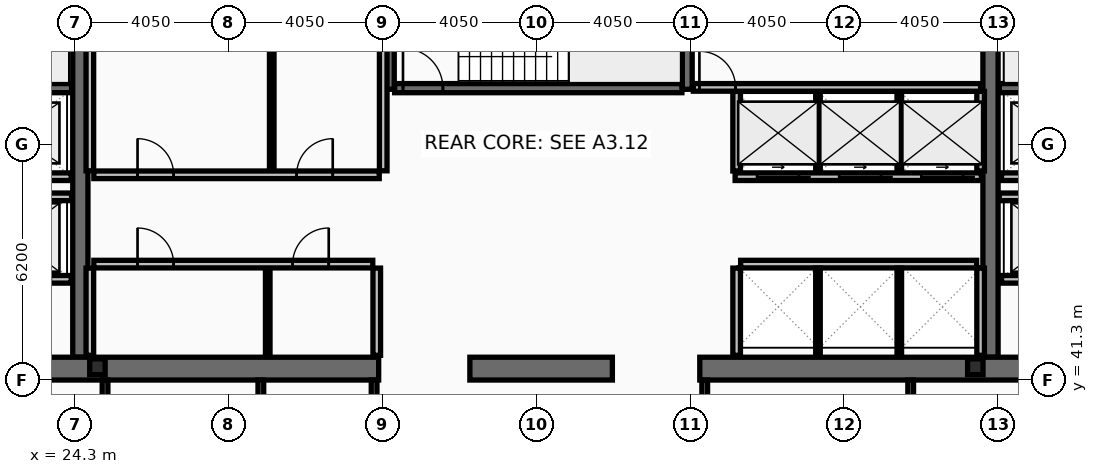
"""IFC4 building model, lengths in metres.
Left out: names, types, materials, properties, quantities, classifications, styles, units other than length and angle.
Written with IfcOpenShell. Run it as: python <this file> out.ifc"""

import sys

from ifc_helpers import new_model, si_unit, direction, frame, frame_2d, origin, origin_2d, place, context, subcontext, project, spatial, rectangle, i_section, extrude, element, fill, save


model = new_model("IFC4")
c1 = context("Model", 3, precision=1e-05, world=origin(), true_north=direction((0.0, 1.0)))
c2 = subcontext(c1, "Body", "Model", "MODEL_VIEW")
j1 = project(units=[si_unit("LENGTHUNIT", "METRE"), si_unit("PLANEANGLEUNIT", "RADIAN")], contexts=[c1])
p1 = place(None, origin())
s1 = spatial("IfcSite", under=j1, at=p1, CompositionType="ELEMENT")
p2 = place(p1, origin())
s2 = spatial("IfcBuilding", under=s1, at=p2, CompositionType="ELEMENT")
p3 = place(p2, frame((0.0, 0.0, 206.6)))
s3 = spatial("IfcBuildingStorey", under=s2, at=p3, CompositionType="ELEMENT", Elevation=206.6)
for number, where, z_axis, x_axis in (
    (1, (24.45, 41.9, 0.0), (0.0, 0.0, 1.0), (0.0, 1.0, 0.0)),
    (2, (48.4, 41.9, 0.0), (0.0, 0.0, 1.0), (0.0, 1.0, 0.0)),
):
    element("IfcWall", number, at=place(p3, frame(where, z_axis=z_axis, x_axis=x_axis)), inside=s3, PredefinedType="SHEAR", context=c2, shape_type="SweptSolid", body=[
        extrude(rectangle(XDim=11.2, YDim=0.4, at=frame_2d((5.6, 0.0))), origin(), (0.0, 0.0, 1.0), 3.44),
    ])
p4 = place(p3, frame((32.3, 41.6, 0.0), z_axis=(0.0, 0.0, 1.0), x_axis=(-1.0, 0.0, 0.0)))
e3 = element("IfcWall", 3, at=p4, inside=s3, PredefinedType="SHEAR", context=c2, shape_type="SweptSolid", body=[
    extrude(rectangle(XDim=11.45, YDim=0.6, at=frame_2d((5.725, 0.0))), origin(), (0.0, 0.0, 1.0), 3.44),
])
p5 = place(p3, frame((38.45, 41.6, 0.0), z_axis=(0.0, 0.0, 1.0), x_axis=(-1.0, 0.0, 0.0)))
e4 = element("IfcWall", 4, at=p5, inside=s3, PredefinedType="SHEAR", context=c2, shape_type="SweptSolid", body=[
    extrude(rectangle(XDim=3.75, YDim=0.6, at=frame_2d((1.875, 0.0))), origin(), (0.0, 0.0, 1.0), 3.44),
])
p6 = place(p3, frame((52.05, 41.6, 0.0), z_axis=(0.0, 0.0, 1.0), x_axis=(-1.0, 0.0, 0.0)))
e5 = element("IfcWall", 5, at=p6, inside=s3, PredefinedType="SHEAR", context=c2, shape_type="SweptSolid", body=[
    extrude(rectangle(XDim=11.3, YDim=0.6, at=frame_2d((5.65, 0.0))), origin(), (0.0, 0.0, 1.0), 3.44),
])
for number, where, z_axis, x_axis in (
    (6, (32.58, 48.95, 0.0), (0.0, 0.0, 1.0), (0.0, 1.0, 0.0)),
    (7, (40.42, 48.95, 0.0), (0.0, 0.0, 1.0), (0.0, 1.0, 0.0)),
):
    element("IfcWall", number, at=place(p3, frame(where, z_axis=z_axis, x_axis=x_axis)), inside=s3, PredefinedType="SHEAR", context=c2, shape_type="SweptSolid", body=[
        extrude(rectangle(XDim=4.15, YDim=0.26, at=frame_2d((2.075, 0.0))), origin(), (0.0, 0.0, 1.0), 3.44),
    ])
p7 = place(p3, frame((16.8, 48.98, 0.0), z_axis=(0.0, 0.0, 1.0), x_axis=(1.0, 0.0, 0.0)))
e8 = element("IfcWall", 8, at=p7, inside=s3, PredefinedType="SHEAR", context=c2, shape_type="SweptSolid", body=[
    extrude(rectangle(XDim=7.42, YDim=0.24, at=frame_2d((3.71, 0.0))), origin(), (0.0, 0.0, 1.0), 3.44),
])
p8 = place(p7, frame((0.22, 0.0, 0.0)))
e9 = element("IfcOpeningElement", 9, at=p8, cuts=e8, PredefinedType="OPENING", context=c2, shape_type="SweptSolid", body=[
    extrude(rectangle(XDim=1.05, YDim=2.15, at=frame_2d((0.525, 1.075))), frame((0.0, 0.13, 0.0), z_axis=(0.0, -1.0, 0.0), x_axis=(1.0, 0.0, 0.0)), (0.0, 0.0, 1.0), 0.26),
])
p9 = place(p3, frame((48.63, 48.98, 0.0), z_axis=(0.0, 0.0, 1.0), x_axis=(1.0, 0.0, 0.0)))
e10 = element("IfcWall", 10, at=p9, inside=s3, PredefinedType="SHEAR", context=c2, shape_type="SweptSolid", body=[
    extrude(rectangle(XDim=7.47, YDim=0.24, at=frame_2d((3.735, 0.0))), origin(), (0.0, 0.0, 1.0), 3.44),
])
p10 = place(p9, frame((6.2, 0.0, 0.0)))
e11 = element("IfcOpeningElement", 11, at=p10, cuts=e10, PredefinedType="OPENING", context=c2, shape_type="SweptSolid", body=[
    extrude(rectangle(XDim=1.05, YDim=2.15, at=frame_2d((0.525, 1.075))), frame((0.0, 0.13, 0.0), z_axis=(0.0, -1.0, 0.0), x_axis=(1.0, 0.0, 0.0)), (0.0, 0.0, 1.0), 0.26),
])
p11 = place(p3, frame((32.72, 48.98, 0.0), z_axis=(0.0, 0.0, 1.0), x_axis=(1.0, 0.0, 0.0)))
e12 = element("IfcWall", 12, at=p11, inside=s3, PredefinedType="SHEAR", context=c2, shape_type="SweptSolid", body=[
    extrude(rectangle(XDim=7.56, YDim=0.24, at=frame_2d((3.78, 0.0))), origin(), (0.0, 0.0, 1.0), 3.44),
])
p12 = place(p11, frame((0.22, 0.0, 0.0)))
e13 = element("IfcOpeningElement", 13, at=p12, cuts=e12, PredefinedType="OPENING", context=c2, shape_type="SweptSolid", body=[
    extrude(rectangle(XDim=1.05, YDim=2.15, at=frame_2d((0.525, 1.075))), frame((0.0, 0.13, 0.0), z_axis=(0.0, -1.0, 0.0), x_axis=(1.0, 0.0, 0.0)), (0.0, 0.0, 1.0), 0.26),
])
for number, where, z_axis, x_axis in (
    (14, (24.9, 41.65, 0.0), (0.0, 0.0, 1.0), (1.0, 0.0, 0.0)),
    (15, (48.0, 41.65, 0.0), (0.0, 0.0, 1.0), (1.0, 0.0, 0.0)),
):
    element("IfcColumn", number, at=place(p3, frame(where, z_axis=z_axis, x_axis=x_axis)), inside=s3, PredefinedType="COLUMN", context=c2, shape_type="SweptSolid", body=[
        extrude(i_section(OverallWidth=0.406, OverallDepth=0.416, WebThickness=0.03, FlangeThickness=0.048, at=origin_2d()), origin(), (0.0, 0.0, 1.0), 3.6),
    ])
p13 = place(p3, frame((51.61, 43.95, 0.0), z_axis=(0.0, 0.0, 1.0), x_axis=(-1.0, 0.0, 0.0)))
e16 = element("IfcWall", 16, at=p13, inside=s3, PredefinedType="PARTITIONING", context=c2, shape_type="SweptSolid", body=[
    extrude(rectangle(XDim=2.92, YDim=0.2, at=frame_2d((1.46, 0.0))), origin(), (0.0, 0.0, 1.0), 3.44),
])
p14 = place(p13, frame((0.81, 0.0, 0.0)))
e17 = element("IfcOpeningElement", 17, at=p14, cuts=e16, PredefinedType="OPENING", context=c2, shape_type="SweptSolid", body=[
    extrude(rectangle(XDim=1.3, YDim=2.18, at=frame_2d((0.65, 1.09))), frame((0.0, 0.11, 0.0), z_axis=(0.0, -1.0, 0.0), x_axis=(1.0, 0.0, 0.0)), (0.0, 0.0, 1.0), 0.22),
])
p15 = place(p3, frame((24.21, 43.95, 0.0), z_axis=(0.0, 0.0, 1.0), x_axis=(-1.0, 0.0, 0.0)))
e18 = element("IfcWall", 18, at=p15, inside=s3, PredefinedType="PARTITIONING", context=c2, shape_type="SweptSolid", body=[
    extrude(rectangle(XDim=2.97, YDim=0.2, at=frame_2d((1.485, 0.0))), origin(), (0.0, 0.0, 1.0), 3.44),
])
p16 = place(p15, frame((0.86, 0.0, 0.0)))
e19 = element("IfcOpeningElement", 19, at=p16, cuts=e18, PredefinedType="OPENING", context=c2, shape_type="SweptSolid", body=[
    extrude(rectangle(XDim=1.3, YDim=2.18, at=frame_2d((0.65, 1.09))), frame((0.0, 0.11, 0.0), z_axis=(0.0, -1.0, 0.0), x_axis=(1.0, 0.0, 0.0)), (0.0, 0.0, 1.0), 0.22),
])
p17 = place(p3, frame((51.61, 46.65, 0.0), z_axis=(0.0, 0.0, 1.0), x_axis=(-1.0, 0.0, 0.0)))
e20 = element("IfcWall", 20, at=p17, inside=s3, PredefinedType="PARTITIONING", context=c2, shape_type="SweptSolid", body=[
    extrude(rectangle(XDim=2.92, YDim=0.2, at=frame_2d((1.46, 0.0))), origin(), (0.0, 0.0, 1.0), 3.44),
])
p18 = place(p17, frame((0.86, 0.0, 0.0)))
e21 = element("IfcOpeningElement", 21, at=p18, cuts=e20, PredefinedType="OPENING", context=c2, shape_type="SweptSolid", body=[
    extrude(rectangle(XDim=1.2, YDim=2.18, at=frame_2d((0.6, 1.09))), frame((0.0, 0.11, 0.0), z_axis=(0.0, -1.0, 0.0), x_axis=(1.0, 0.0, 0.0)), (0.0, 0.0, 1.0), 0.22),
])
p19 = place(p3, frame((24.21, 46.65, 0.0), z_axis=(0.0, 0.0, 1.0), x_axis=(-1.0, 0.0, 0.0)))
e22 = element("IfcWall", 22, at=p19, inside=s3, PredefinedType="PARTITIONING", context=c2, shape_type="SweptSolid", body=[
    extrude(rectangle(XDim=2.97, YDim=0.2, at=frame_2d((1.485, 0.0))), origin(), (0.0, 0.0, 1.0), 3.44),
])
p20 = place(p19, frame((0.91, 0.0, 0.0)))
e23 = element("IfcOpeningElement", 23, at=p20, cuts=e22, PredefinedType="OPENING", context=c2, shape_type="SweptSolid", body=[
    extrude(rectangle(XDim=1.2, YDim=2.18, at=frame_2d((0.6, 1.09))), frame((0.0, 0.11, 0.0), z_axis=(0.0, -1.0, 0.0), x_axis=(1.0, 0.0, 0.0)), (0.0, 0.0, 1.0), 0.22),
])
p21 = place(p3, frame((48.16, 46.65, 0.0), z_axis=(0.0, 0.0, 1.0), x_axis=(-1.0, 0.0, 0.0)))
e24 = element("IfcWall", 24, at=p21, inside=s3, PredefinedType="PARTITIONING", context=c2, shape_type="SweptSolid", body=[
    extrude(rectangle(XDim=6.48, YDim=0.2, at=frame_2d((3.24, 0.0))), origin(), (0.0, 0.0, 1.0), 3.44),
])
p22 = place(p21, frame((4.8, 0.0, 0.0)))
e25 = element("IfcOpeningElement", 25, at=p22, cuts=e24, PredefinedType="OPENING", context=c2, shape_type="SweptSolid", body=[
    extrude(rectangle(XDim=1.1, YDim=2.18, at=frame_2d((0.55, 1.09))), frame((0.0, 0.11, 0.0), z_axis=(0.0, -1.0, 0.0), x_axis=(1.0, 0.0, 0.0)), (0.0, 0.0, 1.0), 0.22),
])
p23 = place(p21, frame((2.64, 0.0, 0.0)))
e26 = element("IfcOpeningElement", 26, at=p23, cuts=e24, PredefinedType="OPENING", context=c2, shape_type="SweptSolid", body=[
    extrude(rectangle(XDim=1.1, YDim=2.18, at=frame_2d((0.55, 1.09))), frame((0.0, 0.11, 0.0), z_axis=(0.0, -1.0, 0.0), x_axis=(1.0, 0.0, 0.0)), (0.0, 0.0, 1.0), 0.22),
])
p24 = place(p21, frame((0.48, 0.0, 0.0)))
e27 = element("IfcOpeningElement", 27, at=p24, cuts=e24, PredefinedType="OPENING", context=c2, shape_type="SweptSolid", body=[
    extrude(rectangle(XDim=1.1, YDim=2.18, at=frame_2d((0.55, 1.09))), frame((0.0, 0.11, 0.0), z_axis=(0.0, -1.0, 0.0), x_axis=(1.0, 0.0, 0.0)), (0.0, 0.0, 1.0), 0.22),
])
p25 = place(p3, frame((21.2, 46.12, 0.0), z_axis=(0.0, 0.0, 1.0), x_axis=(1.0, 0.0, 0.0)))
e28 = element("IfcWall", 28, at=p25, inside=s3, PredefinedType="PARTITIONING", context=c2, shape_type="SweptSolid", body=[
    extrude(rectangle(XDim=3.02, YDim=0.2, at=frame_2d((1.51, 0.0))), origin(), (0.0, 0.0, 1.0), 3.44),
])
p26 = place(p3, frame((48.63, 46.12, 0.0), z_axis=(0.0, 0.0, 1.0), x_axis=(1.0, 0.0, 0.0)))
e29 = element("IfcWall", 29, at=p26, inside=s3, PredefinedType="PARTITIONING", context=c2, shape_type="SweptSolid", body=[
    extrude(rectangle(XDim=3.07, YDim=0.2, at=frame_2d((1.535, 0.0))), origin(), (0.0, 0.0, 1.0), 3.44),
])
for number, where, z_axis, x_axis in (
    (30, (24.7, 46.805, 0.0), (0.0, 0.0, 1.0), (0.0, 1.0, 0.0)),
    (31, (32.42, 46.805, 0.0), (0.0, 0.0, 1.0), (0.0, 1.0, 0.0)),
):
    element("IfcWall", number, at=place(p3, frame(where, z_axis=z_axis, x_axis=x_axis)), inside=s3, PredefinedType="PARTITIONING", context=c2, shape_type="SweptSolid", body=[
        extrude(rectangle(XDim=5.99, YDim=0.2, at=frame_2d((2.995, 0.0))), origin(), (0.0, 0.0, 1.0), 3.44),
    ])
p27 = place(p3, frame((29.486, 46.805, 0.0), z_axis=(0.0, 0.0, 1.0), x_axis=(0.0, 1.0, 0.0)))
e32 = element("IfcWall", 32, at=p27, inside=s3, PredefinedType="PARTITIONING", context=c2, shape_type="SweptSolid", body=[
    extrude(rectangle(XDim=5.99, YDim=0.12, at=frame_2d((2.995, 0.0))), origin(), (0.0, 0.0, 1.0), 3.44),
])
p28 = place(p3, frame((24.805, 46.7, 0.0), z_axis=(0.0, 0.0, 1.0), x_axis=(1.0, 0.0, 0.0)))
e33 = element("IfcWall", 33, at=p28, inside=s3, PredefinedType="PARTITIONING", context=c2, shape_type="SweptSolid", body=[
    extrude(rectangle(XDim=7.51, YDim=0.2, at=frame_2d((3.755, 0.0))), origin(), (0.0, 0.0, 1.0), 3.44),
])
p29 = place(p28, frame((1.15, 0.0, 0.0)))
e34 = element("IfcOpeningElement", 34, at=p29, cuts=e33, PredefinedType="OPENING", context=c2, shape_type="SweptSolid", body=[
    extrude(rectangle(XDim=0.95, YDim=2.1, at=frame_2d((0.475, 1.05))), frame((0.0, 0.11, 0.0), z_axis=(0.0, -1.0, 0.0), x_axis=(1.0, 0.0, 0.0)), (0.0, 0.0, 1.0), 0.22),
])
p30 = place(p28, frame((5.336, 0.0, 0.0)))
e35 = element("IfcOpeningElement", 35, at=p30, cuts=e33, PredefinedType="OPENING", context=c2, shape_type="SweptSolid", body=[
    extrude(rectangle(XDim=0.95, YDim=2.1, at=frame_2d((0.475, 1.05))), frame((0.0, 0.11, 0.0), z_axis=(0.0, -1.0, 0.0), x_axis=(1.0, 0.0, 0.0)), (0.0, 0.0, 1.0), 0.22),
])
for number, where, z_axis, x_axis in (
    (36, (24.7, 41.95, 0.0), (0.0, 0.0, 1.0), (0.0, 1.0, 0.0)),
    (37, (32.25, 41.95, 0.0), (0.0, 0.0, 1.0), (0.0, 1.0, 0.0)),
):
    element("IfcWall", number, at=place(p3, frame(where, z_axis=z_axis, x_axis=x_axis)), inside=s3, PredefinedType="PARTITIONING", context=c2, shape_type="SweptSolid", body=[
        extrude(rectangle(XDim=2.295, YDim=0.2, at=frame_2d((1.147, 0.0))), origin(), (0.0, 0.0, 1.0), 3.44),
    ])
p31 = place(p3, frame((29.381, 41.95, 0.0), z_axis=(0.0, 0.0, 1.0), x_axis=(0.0, 1.0, 0.0)))
e38 = element("IfcWall", 38, at=p31, inside=s3, PredefinedType="PARTITIONING", context=c2, shape_type="SweptSolid", body=[
    extrude(rectangle(XDim=2.295, YDim=0.12, at=frame_2d((1.147, 0.0))), origin(), (0.0, 0.0, 1.0), 3.44),
])
p32 = place(p3, frame((24.805, 44.35, 0.0), z_axis=(0.0, 0.0, 1.0), x_axis=(1.0, 0.0, 0.0)))
e39 = element("IfcWall", 39, at=p32, inside=s3, PredefinedType="PARTITIONING", context=c2, shape_type="SweptSolid", body=[
    extrude(rectangle(XDim=7.34, YDim=0.2, at=frame_2d((3.67, 0.0))), origin(), (0.0, 0.0, 1.0), 3.44),
])
p33 = place(p32, frame((1.15, 0.0, 0.0)))
e40 = element("IfcOpeningElement", 40, at=p33, cuts=e39, PredefinedType="OPENING", context=c2, shape_type="SweptSolid", body=[
    extrude(rectangle(XDim=0.95, YDim=2.1, at=frame_2d((0.475, 1.05))), frame((0.0, 0.11, 0.0), z_axis=(0.0, -1.0, 0.0), x_axis=(1.0, 0.0, 0.0)), (0.0, 0.0, 1.0), 0.22),
])
p34 = place(p32, frame((5.231, 0.0, 0.0)))
e41 = element("IfcOpeningElement", 41, at=p34, cuts=e39, PredefinedType="OPENING", context=c2, shape_type="SweptSolid", body=[
    extrude(rectangle(XDim=0.95, YDim=2.1, at=frame_2d((0.475, 1.05))), frame((0.0, 0.11, 0.0), z_axis=(0.0, -1.0, 0.0), x_axis=(1.0, 0.0, 0.0)), (0.0, 0.0, 1.0), 0.22),
])
for number, where, z_axis, x_axis in (
    (42, (41.72, 46.8, 0.0), (0.0, 0.0, 1.0), (0.0, 1.0, 0.0)),
    (43, (48.14, 46.8, 0.0), (0.0, 0.0, 1.0), (0.0, 1.0, 0.0)),
):
    element("IfcWall", number, at=place(p3, frame(where, z_axis=z_axis, x_axis=x_axis)), inside=s3, PredefinedType="PARTITIONING", context=c2, shape_type="SweptSolid", body=[
        extrude(rectangle(XDim=2.095, YDim=0.2, at=frame_2d((1.047, 0.0))), origin(), (0.0, 0.0, 1.0), 3.44),
    ])
for number, where, z_axis, x_axis in (
    (44, (43.86, 46.8, 0.0), (0.0, 0.0, 1.0), (0.0, 1.0, 0.0)),
    (45, (46.0, 46.8, 0.0), (0.0, 0.0, 1.0), (0.0, 1.0, 0.0)),
):
    element("IfcWall", number, at=place(p3, frame(where, z_axis=z_axis, x_axis=x_axis)), inside=s3, PredefinedType="PARTITIONING", context=c2, shape_type="SweptSolid", body=[
        extrude(rectangle(XDim=2.095, YDim=0.12, at=frame_2d((1.047, 0.0))), origin(), (0.0, 0.0, 1.0), 3.44),
    ])
p35 = place(p3, frame((41.825, 44.35, 0.0), z_axis=(0.0, 0.0, 1.0), x_axis=(1.0, 0.0, 0.0)))
e46 = element("IfcWall", 46, at=p35, inside=s3, PredefinedType="PARTITIONING", context=c2, shape_type="SweptSolid", body=[
    extrude(rectangle(XDim=6.21, YDim=0.2, at=frame_2d((3.105, 0.0))), origin(), (0.0, 0.0, 1.0), 3.44),
])
for number, where, z_axis, x_axis in (
    (47, (41.72, 41.95, 0.0), (0.0, 0.0, 1.0), (0.0, 1.0, 0.0)),
    (48, (48.14, 41.95, 0.0), (0.0, 0.0, 1.0), (0.0, 1.0, 0.0)),
):
    element("IfcWall", number, at=place(p3, frame(where, z_axis=z_axis, x_axis=x_axis)), inside=s3, PredefinedType="PARTITIONING", context=c2, shape_type="SweptSolid", body=[
        extrude(rectangle(XDim=2.295, YDim=0.2, at=frame_2d((1.147, 0.0))), origin(), (0.0, 0.0, 1.0), 3.44),
    ])
for number, where, z_axis, x_axis in (
    (49, (43.86, 41.95, 0.0), (0.0, 0.0, 1.0), (0.0, 1.0, 0.0)),
    (50, (46.0, 41.95, 0.0), (0.0, 0.0, 1.0), (0.0, 1.0, 0.0)),
):
    element("IfcWall", number, at=place(p3, frame(where, z_axis=z_axis, x_axis=x_axis)), inside=s3, PredefinedType="PARTITIONING", context=c2, shape_type="SweptSolid", body=[
        extrude(rectangle(XDim=2.295, YDim=0.12, at=frame_2d((1.147, 0.0))), origin(), (0.0, 0.0, 1.0), 3.44),
    ])
p36 = place(p3, frame((40.58, 49.0, 0.0), z_axis=(0.0, 0.0, 1.0), x_axis=(1.0, 0.0, 0.0)))
e51 = element("IfcWall", 51, at=p36, inside=s3, PredefinedType="PARTITIONING", context=c2, shape_type="SweptSolid", body=[
    extrude(rectangle(XDim=7.56, YDim=0.2, at=frame_2d((3.78, 0.0))), origin(), (0.0, 0.0, 1.0), 3.44),
])
p37 = place(p36, frame((0.16, 0.0, 0.0)))
e52 = element("IfcOpeningElement", 52, at=p37, cuts=e51, PredefinedType="OPENING", context=c2, shape_type="SweptSolid", body=[
    extrude(rectangle(XDim=0.95, YDim=2.1, at=frame_2d((0.475, 1.05))), frame((0.0, 0.11, 0.0), z_axis=(0.0, -1.0, 0.0), x_axis=(1.0, 0.0, 0.0)), (0.0, 0.0, 1.0), 0.22),
])
p38 = place(p3, frame((25.1, 38.28, 0.0), z_axis=(0.0, 0.0, 1.0), x_axis=(0.0, 1.0, 0.0)))
e53 = element("IfcWall", 53, at=p38, inside=s3, PredefinedType="PARTITIONING", context=c2, shape_type="SweptSolid", body=[
    extrude(rectangle(XDim=3.02, YDim=0.15, at=frame_2d((1.51, 0.0))), origin(), (0.0, 0.0, 1.0), 2.73),
])
for number, where, z_axis, x_axis in (
    (54, (29.2, 38.28, 0.0), (0.0, 0.0, 1.0), (0.0, 1.0, 0.0)),
    (55, (32.18, 38.28, 0.0), (0.0, 0.0, 1.0), (0.0, 1.0, 0.0)),
    (56, (40.88, 38.28, 0.0), (0.0, 0.0, 1.0), (0.0, 1.0, 0.0)),
    (57, (46.3, 38.28, 0.0), (0.0, 0.0, 1.0), (0.0, 1.0, 0.0)),
):
    element("IfcWall", number, at=place(p3, frame(where, z_axis=z_axis, x_axis=x_axis)), inside=s3, PredefinedType="PARTITIONING", context=c2, shape_type="SweptSolid", body=[
        extrude(rectangle(XDim=3.02, YDim=0.15, at=frame_2d((1.51, 0.0))), origin(), (0.0, 0.0, 1.0), 3.44),
    ])
p39 = place(p12, origin())
e58 = element("IfcDoor", 58, at=p39, inside=s3, OperationType="SINGLE_SWING_LEFT", PredefinedType="DOOR", context=c2, shape_type="SweptSolid", body=[
    extrude(rectangle(XDim=1.05, YDim=2.15, at=frame_2d((0.525, 1.075))), frame((0.0, 0.025, 0.0), z_axis=(0.0, -1.0, 0.0), x_axis=(1.0, 0.0, 0.0)), (0.0, 0.0, 1.0), 0.05),
])
fill(e13, e58)
p40 = place(p22, origin())
e59 = element("IfcDoor", 59, at=p40, inside=s3, OperationType="SLIDING_TO_LEFT", PredefinedType="DOOR", context=c2, shape_type="SweptSolid", body=[
    extrude(rectangle(XDim=1.1, YDim=2.18, at=frame_2d((0.55, 1.09))), frame((0.0, 0.025, 0.0), z_axis=(0.0, -1.0, 0.0), x_axis=(1.0, 0.0, 0.0)), (0.0, 0.0, 1.0), 0.05),
])
fill(e25, e59)
p41 = place(p23, origin())
e60 = element("IfcDoor", 60, at=p41, inside=s3, OperationType="SLIDING_TO_LEFT", PredefinedType="DOOR", context=c2, shape_type="SweptSolid", body=[
    extrude(rectangle(XDim=1.1, YDim=2.18, at=frame_2d((0.55, 1.09))), frame((0.0, 0.025, 0.0), z_axis=(0.0, -1.0, 0.0), x_axis=(1.0, 0.0, 0.0)), (0.0, 0.0, 1.0), 0.05),
])
fill(e26, e60)
p42 = place(p24, origin())
e61 = element("IfcDoor", 61, at=p42, inside=s3, OperationType="SLIDING_TO_LEFT", PredefinedType="DOOR", context=c2, shape_type="SweptSolid", body=[
    extrude(rectangle(XDim=1.1, YDim=2.18, at=frame_2d((0.55, 1.09))), frame((0.0, 0.025, 0.0), z_axis=(0.0, -1.0, 0.0), x_axis=(1.0, 0.0, 0.0)), (0.0, 0.0, 1.0), 0.05),
])
fill(e27, e61)
p43 = place(p29, origin())
e62 = element("IfcDoor", 62, at=p43, inside=s3, OperationType="SINGLE_SWING_LEFT", PredefinedType="DOOR", context=c2, shape_type="SweptSolid", body=[
    extrude(rectangle(XDim=0.95, YDim=2.1, at=frame_2d((0.475, 1.05))), frame((0.0, 0.025, 0.0), z_axis=(0.0, -1.0, 0.0), x_axis=(1.0, 0.0, 0.0)), (0.0, 0.0, 1.0), 0.05),
])
fill(e34, e62)
p44 = place(p30, origin())
e63 = element("IfcDoor", 63, at=p44, inside=s3, OperationType="SINGLE_SWING_RIGHT", PredefinedType="DOOR", context=c2, shape_type="SweptSolid", body=[
    extrude(rectangle(XDim=0.95, YDim=2.1, at=frame_2d((0.475, 1.05))), frame((0.0, 0.025, 0.0), z_axis=(0.0, -1.0, 0.0), x_axis=(1.0, 0.0, 0.0)), (0.0, 0.0, 1.0), 0.05),
])
fill(e35, e63)
p45 = place(p33, origin())
e64 = element("IfcDoor", 64, at=p45, inside=s3, OperationType="SINGLE_SWING_LEFT", PredefinedType="DOOR", context=c2, shape_type="SweptSolid", body=[
    extrude(rectangle(XDim=0.95, YDim=2.1, at=frame_2d((0.475, 1.05))), frame((0.0, 0.025, 0.0), z_axis=(0.0, -1.0, 0.0), x_axis=(1.0, 0.0, 0.0)), (0.0, 0.0, 1.0), 0.05),
])
fill(e40, e64)
p46 = place(p34, origin())
e65 = element("IfcDoor", 65, at=p46, inside=s3, OperationType="SINGLE_SWING_RIGHT", PredefinedType="DOOR", context=c2, shape_type="SweptSolid", body=[
    extrude(rectangle(XDim=0.95, YDim=2.1, at=frame_2d((0.475, 1.05))), frame((0.0, 0.025, 0.0), z_axis=(0.0, -1.0, 0.0), x_axis=(1.0, 0.0, 0.0)), (0.0, 0.0, 1.0), 0.05),
])
fill(e41, e65)
p47 = place(p37, origin())
e66 = element("IfcDoor", 66, at=p47, inside=s3, OperationType="SINGLE_SWING_LEFT", PredefinedType="DOOR", context=c2, shape_type="SweptSolid", body=[
    extrude(rectangle(XDim=0.95, YDim=2.1, at=frame_2d((0.475, 1.05))), frame((0.0, 0.025, 0.0), z_axis=(0.0, -1.0, 0.0), x_axis=(1.0, 0.0, 0.0)), (0.0, 0.0, 1.0), 0.05),
])
fill(e52, e66)
save(model, sys.argv[1])
